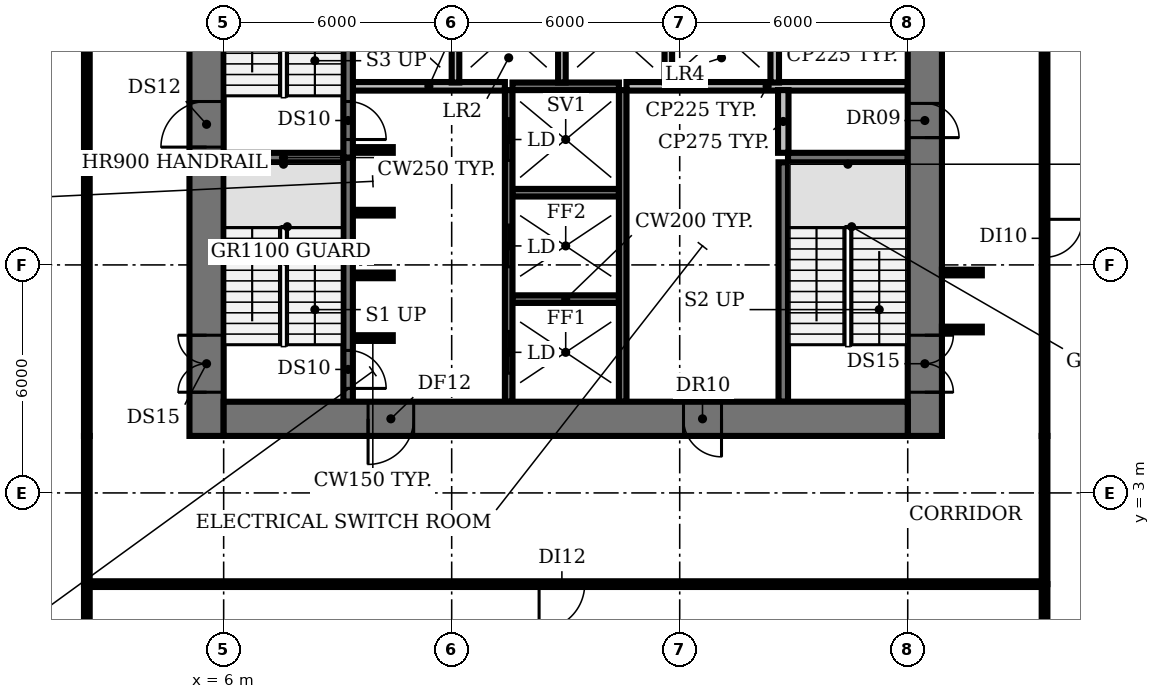
"""IFC4 building model, lengths in metres.
Left out: names, types, materials, properties, quantities, classifications, styles, units other than length and angle.
Written with IfcOpenShell. Run it as: python <this file> out.ifc"""

import sys

from ifc_helpers import new_model, si_unit, direction, frame, frame_2d, origin, place, context, subcontext, project, spatial, rectangle, extrude, element, fill, save


model = new_model("IFC4")
c1 = context("Model", 3, precision=1e-05, world=origin(), true_north=direction((0.0, 1.0)))
c2 = subcontext(c1, "Body", "Model", "MODEL_VIEW")
j1 = project(units=[si_unit("LENGTHUNIT", "METRE"), si_unit("PLANEANGLEUNIT", "RADIAN")], contexts=[c1])
p1 = place(None, origin())
s1 = spatial("IfcSite", under=j1, at=p1, CompositionType="ELEMENT")
p2 = place(p1, origin())
s2 = spatial("IfcBuilding", under=s1, at=p2, CompositionType="ELEMENT")
p3 = place(p2, frame((0.0, 0.0, 45.8)))
s3 = spatial("IfcBuildingStorey", under=s2, at=p3, CompositionType="ELEMENT", Elevation=45.8)
p4 = place(p3, frame((9.4, 7.075, 0.0), z_axis=(0.0, 0.0, 1.0), x_axis=(1.0, 0.0, 0.0)))
e1 = element("IfcWall", 1, at=p4, inside=s3, PredefinedType="SHEAR", context=c2, shape_type="SweptSolid", body=[
    extrude(rectangle(XDim=1.05, YDim=0.15, at=frame_2d((0.525, 0.0))), origin(), (0.0, 0.0, 1.0), 3.85),
])
p5 = place(p3, frame((13.6, 8.1, 0.0), z_axis=(0.0, 0.0, 1.0), x_axis=(1.0, 0.0, 0.0)))
e2 = element("IfcWall", 2, at=p5, inside=s3, PredefinedType="SHEAR", context=c2, shape_type="SweptSolid", body=[
    extrude(rectangle(XDim=2.8, YDim=0.2, at=frame_2d((1.4, 0.0))), origin(), (0.0, 0.0, 1.0), 3.85),
])
for number, where, z_axis, x_axis in (
    (3, (9.4, 8.725, 0.0), (0.0, 0.0, 1.0), (1.0, 0.0, 0.0)),
    (4, (9.4, 10.375, 0.0), (0.0, 0.0, 1.0), (1.0, 0.0, 0.0)),
):
    element("IfcWall", number, at=place(p3, frame(where, z_axis=z_axis, x_axis=x_axis)), inside=s3, PredefinedType="SHEAR", context=c2, shape_type="SweptSolid", body=[
        extrude(rectangle(XDim=1.05, YDim=0.15, at=frame_2d((0.525, 0.0))), origin(), (0.0, 0.0, 1.0), 3.85),
    ])
p6 = place(p3, frame((13.6, 10.9, 0.0), z_axis=(0.0, 0.0, 1.0), x_axis=(1.0, 0.0, 0.0)))
e5 = element("IfcWall", 5, at=p6, inside=s3, PredefinedType="SHEAR", context=c2, shape_type="SweptSolid", body=[
    extrude(rectangle(XDim=2.8, YDim=0.2, at=frame_2d((1.4, 0.0))), origin(), (0.0, 0.0, 1.0), 3.85),
])
for number, where, z_axis, x_axis in (
    (6, (6.0, 11.825, 0.0), (0.0, 0.0, 1.0), (1.0, 0.0, 0.0)),
    (7, (20.85, 11.825, 0.0), (0.0, 0.0, 1.0), (1.0, 0.0, 0.0)),
):
    element("IfcWall", number, at=place(p3, frame(where, z_axis=z_axis, x_axis=x_axis)), inside=s3, PredefinedType="SHEAR", context=c2, shape_type="SweptSolid", body=[
        extrude(rectangle(XDim=3.15, YDim=0.25, at=frame_2d((1.575, 0.0))), origin(), (0.0, 0.0, 1.0), 3.85),
    ])
p7 = place(p3, frame((9.4, 12.025, 0.0), z_axis=(0.0, 0.0, 1.0), x_axis=(1.0, 0.0, 0.0)))
e8 = element("IfcWall", 8, at=p7, inside=s3, PredefinedType="SHEAR", context=c2, shape_type="SweptSolid", body=[
    extrude(rectangle(XDim=1.05, YDim=0.15, at=frame_2d((0.525, 0.0))), origin(), (0.0, 0.0, 1.0), 3.85),
])
p8 = place(p3, frame((9.4, 13.7, 0.0), z_axis=(0.0, 0.0, 1.0), x_axis=(1.0, 0.0, 0.0)))
e9 = element("IfcWall", 9, at=p8, inside=s3, PredefinedType="PARTITIONING", context=c2, shape_type="SweptSolid", body=[
    extrude(rectangle(XDim=4.0, YDim=0.225, at=frame_2d((2.0, 0.0))), origin(), (0.0, 0.0, 1.0), 3.85),
])
p9 = place(p3, frame((13.6, 13.7, 0.0), z_axis=(0.0, 0.0, 1.0), x_axis=(1.0, 0.0, 0.0)))
e10 = element("IfcWall", 10, at=p9, inside=s3, PredefinedType="SHEAR", context=c2, shape_type="SweptSolid", body=[
    extrude(rectangle(XDim=2.8, YDim=0.2, at=frame_2d((1.4, 0.0))), origin(), (0.0, 0.0, 1.0), 3.85),
])
p10 = place(p3, frame((16.6, 13.7, 0.0), z_axis=(0.0, 0.0, 1.0), x_axis=(1.0, 0.0, 0.0)))
e11 = element("IfcWall", 11, at=p10, inside=s3, PredefinedType="PARTITIONING", context=c2, shape_type="SweptSolid", body=[
    extrude(rectangle(XDim=7.4, YDim=0.225, at=frame_2d((3.7, 0.0))), origin(), (0.0, 0.0, 1.0), 3.85),
])
p11 = place(p3, frame((9.275, 11.825, 0.0), z_axis=(0.0, 0.0, 1.0), x_axis=(0.0, -1.0, 0.0)))
e12 = element("IfcWall", 12, at=p11, inside=s3, PredefinedType="SHEAR", context=c2, shape_type="SweptSolid", body=[
    extrude(rectangle(XDim=6.425, YDim=0.25, at=frame_2d((3.212, 0.0))), origin(), (0.0, 0.0, 1.0), 3.85),
])
p12 = place(p11, frame((5.075, 0.0, 0.0)))
e13 = element("IfcOpeningElement", 13, at=p12, cuts=e12, PredefinedType="OPENING", context=c2, shape_type="SweptSolid", body=[
    extrude(rectangle(XDim=1.0, YDim=2.1, at=frame_2d((0.5, 1.05))), frame((0.0, 0.135, 0.0), z_axis=(0.0, -1.0, 0.0), x_axis=(1.0, 0.0, 0.0)), (0.0, 0.0, 1.0), 0.27),
])
p13 = place(p3, frame((9.275, 18.375, 0.0), z_axis=(0.0, 0.0, 1.0), x_axis=(0.0, -1.0, 0.0)))
e14 = element("IfcWall", 14, at=p13, inside=s3, PredefinedType="SHEAR", context=c2, shape_type="SweptSolid", body=[
    extrude(rectangle(XDim=6.55, YDim=0.25, at=frame_2d((3.275, 0.0))), origin(), (0.0, 0.0, 1.0), 3.85),
])
p14 = place(p13, frame((5.075, 0.0, 0.0)))
e15 = element("IfcOpeningElement", 15, at=p14, cuts=e14, PredefinedType="OPENING", context=c2, shape_type="SweptSolid", body=[
    extrude(rectangle(XDim=1.0, YDim=2.1, at=frame_2d((0.5, 1.05))), frame((0.0, 0.135, 0.0), z_axis=(0.0, -1.0, 0.0), x_axis=(1.0, 0.0, 0.0)), (0.0, 0.0, 1.0), 0.27),
])
p15 = place(p3, frame((12.1, 13.8, 0.0), z_axis=(0.0, 0.0, 1.0), x_axis=(0.0, 1.0, 0.0)))
e16 = element("IfcWall", 16, at=p15, inside=s3, PredefinedType="SOLIDWALL", context=c2, shape_type="SweptSolid", body=[
    extrude(rectangle(XDim=2.6, YDim=0.2, at=frame_2d((1.3, 0.0))), origin(), (0.0, 0.0, 1.0), 3.85),
])
p16 = place(p3, frame((13.5, 5.4, 0.0), z_axis=(0.0, 0.0, 1.0), x_axis=(0.0, 1.0, 0.0)))
e17 = element("IfcWall", 17, at=p16, inside=s3, PredefinedType="SHEAR", context=c2, shape_type="SweptSolid", body=[
    extrude(rectangle(XDim=8.2, YDim=0.2, at=frame_2d((4.1, 0.0))), origin(), (0.0, 0.0, 1.0), 3.85),
])
p17 = place(p16, frame((0.75, 0.0, 0.0)))
e18 = element("IfcOpeningElement", 18, at=p17, cuts=e17, PredefinedType="OPENING", context=c2, shape_type="SweptSolid", body=[
    extrude(rectangle(XDim=1.1, YDim=2.1, at=frame_2d((0.55, 1.05))), frame((0.0, 0.11, 0.0), z_axis=(0.0, -1.0, 0.0), x_axis=(1.0, 0.0, 0.0)), (0.0, 0.0, 1.0), 0.22),
])
p18 = place(p16, frame((3.55, 0.0, 0.0)))
e19 = element("IfcOpeningElement", 19, at=p18, cuts=e17, PredefinedType="OPENING", context=c2, shape_type="SweptSolid", body=[
    extrude(rectangle(XDim=1.1, YDim=2.1, at=frame_2d((0.55, 1.05))), frame((0.0, 0.11, 0.0), z_axis=(0.0, -1.0, 0.0), x_axis=(1.0, 0.0, 0.0)), (0.0, 0.0, 1.0), 0.22),
])
p19 = place(p16, frame((6.35, 0.0, 0.0)))
e20 = element("IfcOpeningElement", 20, at=p19, cuts=e17, PredefinedType="OPENING", context=c2, shape_type="SweptSolid", body=[
    extrude(rectangle(XDim=1.1, YDim=2.1, at=frame_2d((0.55, 1.05))), frame((0.0, 0.11, 0.0), z_axis=(0.0, -1.0, 0.0), x_axis=(1.0, 0.0, 0.0)), (0.0, 0.0, 1.0), 0.22),
])
p20 = place(p3, frame((14.9, 13.8, 0.0), z_axis=(0.0, 0.0, 1.0), x_axis=(0.0, 1.0, 0.0)))
e21 = element("IfcWall", 21, at=p20, inside=s3, PredefinedType="SOLIDWALL", context=c2, shape_type="SweptSolid", body=[
    extrude(rectangle(XDim=2.6, YDim=0.2, at=frame_2d((1.3, 0.0))), origin(), (0.0, 0.0, 1.0), 3.85),
])
p21 = place(p3, frame((16.5, 5.4, 0.0), z_axis=(0.0, 0.0, 1.0), x_axis=(0.0, 1.0, 0.0)))
e22 = element("IfcWall", 22, at=p21, inside=s3, PredefinedType="SHEAR", context=c2, shape_type="SweptSolid", body=[
    extrude(rectangle(XDim=8.2, YDim=0.2, at=frame_2d((4.1, 0.0))), origin(), (0.0, 0.0, 1.0), 3.85),
])
p22 = place(p3, frame((17.7, 13.8, 0.0), z_axis=(0.0, 0.0, 1.0), x_axis=(0.0, 1.0, 0.0)))
e23 = element("IfcWall", 23, at=p22, inside=s3, PredefinedType="SOLIDWALL", context=c2, shape_type="SweptSolid", body=[
    extrude(rectangle(XDim=2.6, YDim=0.2, at=frame_2d((1.3, 0.0))), origin(), (0.0, 0.0, 1.0), 3.85),
])
p23 = place(p3, frame((20.5, 13.8, 0.0), z_axis=(0.0, 0.0, 1.0), x_axis=(0.0, 1.0, 0.0)))
e24 = element("IfcWall", 24, at=p23, inside=s3, PredefinedType="PARTITIONING", context=c2, shape_type="SweptSolid", body=[
    extrude(rectangle(XDim=2.6, YDim=0.225, at=frame_2d((1.3, 0.0))), origin(), (0.0, 0.0, 1.0), 3.85),
])
p24 = place(p3, frame((20.725, 5.4, 0.0), z_axis=(0.0, 0.0, 1.0), x_axis=(0.0, 1.0, 0.0)))
e25 = element("IfcWall", 25, at=p24, inside=s3, PredefinedType="SHEAR", context=c2, shape_type="SweptSolid", body=[
    extrude(rectangle(XDim=6.3, YDim=0.25, at=frame_2d((3.15, 0.0))), origin(), (0.0, 0.0, 1.0), 3.85),
])
p25 = place(p3, frame((20.725, 11.95, 0.0), z_axis=(0.0, 0.0, 1.0), x_axis=(0.0, 1.0, 0.0)))
e26 = element("IfcWall", 26, at=p25, inside=s3, PredefinedType="PARTITIONING", context=c2, shape_type="SweptSolid", body=[
    extrude(rectangle(XDim=1.65, YDim=0.275, at=frame_2d((0.825, 0.0))), origin(), (0.0, 0.0, 1.0), 3.85),
])
p26 = place(p3, frame((5.55, 4.5, 0.0), z_axis=(0.0, 0.0, 1.0), x_axis=(0.0, 1.0, 0.0)))
e27 = element("IfcWall", 27, at=p26, inside=s3, PredefinedType="SHEAR", context=c2, shape_type="SweptSolid", body=[
    extrude(rectangle(XDim=21.2, YDim=0.9, at=frame_2d((10.6, 0.0))), origin(), (0.0, 0.0, 1.0), 3.85),
])
p27 = place(p26, frame((1.15, 0.0, 0.0)))
e28 = element("IfcOpeningElement", 28, at=p27, cuts=e27, PredefinedType="OPENING", context=c2, shape_type="SweptSolid", body=[
    extrude(rectangle(XDim=1.5, YDim=2.1, at=frame_2d((0.75, 1.05))), frame((0.0, 0.46, 0.0), z_axis=(0.0, -1.0, 0.0), x_axis=(1.0, 0.0, 0.0)), (0.0, 0.0, 1.0), 0.92),
])
p28 = place(p26, frame((7.6, 0.0, 0.0)))
e29 = element("IfcOpeningElement", 29, at=p28, cuts=e27, PredefinedType="OPENING", context=c2, shape_type="SweptSolid", body=[
    extrude(rectangle(XDim=1.2, YDim=2.1, at=frame_2d((0.6, 1.05))), frame((0.0, 0.46, 0.0), z_axis=(0.0, -1.0, 0.0), x_axis=(1.0, 0.0, 0.0)), (0.0, 0.0, 1.0), 0.92),
])
p29 = place(p26, frame((14.15, 0.0, 0.0)))
e30 = element("IfcOpeningElement", 30, at=p29, cuts=e27, PredefinedType="OPENING", context=c2, shape_type="SweptSolid", body=[
    extrude(rectangle(XDim=1.2, YDim=2.1, at=frame_2d((0.6, 1.05))), frame((0.0, 0.46, 0.0), z_axis=(0.0, -1.0, 0.0), x_axis=(1.0, 0.0, 0.0)), (0.0, 0.0, 1.0), 0.92),
])
p30 = place(p3, frame((24.45, 25.7, 0.0), z_axis=(0.0, 0.0, 1.0), x_axis=(0.0, -1.0, 0.0)))
e31 = element("IfcWall", 31, at=p30, inside=s3, PredefinedType="SHEAR", context=c2, shape_type="SweptSolid", body=[
    extrude(rectangle(XDim=21.2, YDim=0.9, at=frame_2d((10.6, 0.0))), origin(), (0.0, 0.0, 1.0), 3.85),
])
p31 = place(p30, frame((18.55, 0.0, 0.0)))
e32 = element("IfcOpeningElement", 32, at=p31, cuts=e31, PredefinedType="OPENING", context=c2, shape_type="SweptSolid", body=[
    extrude(rectangle(XDim=1.5, YDim=2.1, at=frame_2d((0.75, 1.05))), frame((0.0, 0.46, 0.0), z_axis=(0.0, -1.0, 0.0), x_axis=(1.0, 0.0, 0.0)), (0.0, 0.0, 1.0), 0.92),
])
p32 = place(p30, frame((12.45, 0.0, 0.0)))
e33 = element("IfcOpeningElement", 33, at=p32, cuts=e31, PredefinedType="OPENING", context=c2, shape_type="SweptSolid", body=[
    extrude(rectangle(XDim=0.9, YDim=2.1, at=frame_2d((0.45, 1.05))), frame((0.0, 0.46, 0.0), z_axis=(0.0, -1.0, 0.0), x_axis=(1.0, 0.0, 0.0)), (0.0, 0.0, 1.0), 0.92),
])
p33 = place(p30, frame((6.45, 0.0, 0.0)))
e34 = element("IfcOpeningElement", 34, at=p33, cuts=e31, PredefinedType="OPENING", context=c2, shape_type="SweptSolid", body=[
    extrude(rectangle(XDim=2.0, YDim=2.1, at=frame_2d((1.0, 1.05))), frame((0.0, 0.46, 0.0), z_axis=(0.0, -1.0, 0.0), x_axis=(1.0, 0.0, 0.0)), (0.0, 0.0, 1.0), 0.92),
])
p34 = place(p3, frame((24.0, 4.95, 0.0), z_axis=(0.0, 0.0, 1.0), x_axis=(-1.0, 0.0, 0.0)))
e35 = element("IfcWall", 35, at=p34, inside=s3, PredefinedType="SHEAR", context=c2, shape_type="SweptSolid", body=[
    extrude(rectangle(XDim=18.0, YDim=0.9, at=frame_2d((9.0, 0.0))), origin(), (0.0, 0.0, 1.0), 3.85),
])
p35 = place(p34, frame((13.0, 0.0, 0.0)))
e36 = element("IfcOpeningElement", 36, at=p35, cuts=e35, PredefinedType="OPENING", context=c2, shape_type="SweptSolid", body=[
    extrude(rectangle(XDim=1.2, YDim=2.1, at=frame_2d((0.6, 1.05))), frame((0.0, 0.46, 0.0), z_axis=(0.0, -1.0, 0.0), x_axis=(1.0, 0.0, 0.0)), (0.0, 0.0, 1.0), 0.92),
])
p36 = place(p34, frame((4.9, 0.0, 0.0)))
e37 = element("IfcOpeningElement", 37, at=p36, cuts=e35, PredefinedType="OPENING", context=c2, shape_type="SweptSolid", body=[
    extrude(rectangle(XDim=1.0, YDim=2.1, at=frame_2d((0.5, 1.05))), frame((0.0, 0.46, 0.0), z_axis=(0.0, -1.0, 0.0), x_axis=(1.0, 0.0, 0.0)), (0.0, 0.0, 1.0), 0.92),
])
p37 = place(p3, frame((2.4, -1.862, 0.0), z_axis=(0.0, 0.0, 1.0), x_axis=(0.0, 1.0, 0.0)))
e38 = element("IfcWall", 38, at=p37, inside=s3, PredefinedType="PARTITIONING", context=c2, shape_type="SweptSolid", body=[
    extrude(rectangle(XDim=2.462, YDim=0.15, at=frame_2d((1.231, 0.0))), origin(), (0.0, 0.0, 1.0), 2.83),
])
p38 = place(p3, frame((2.4, 0.6, 0.0), z_axis=(0.0, 0.0, 1.0), x_axis=(0.0, 1.0, 0.0)))
e39 = element("IfcWall", 39, at=p38, inside=s3, PredefinedType="PARTITIONING", context=c2, shape_type="SweptSolid", body=[
    extrude(rectangle(XDim=3.9, YDim=0.15, at=frame_2d((1.95, 0.0))), origin(), (0.0, 0.0, 1.0), 2.83),
])
p39 = place(p3, frame((2.4, 4.5, 0.0), z_axis=(0.0, 0.0, 1.0), x_axis=(0.0, 1.0, 0.0)))
e40 = element("IfcWall", 40, at=p39, inside=s3, PredefinedType="PARTITIONING", context=c2, shape_type="SweptSolid", body=[
    extrude(rectangle(XDim=21.2, YDim=0.15, at=frame_2d((10.6, 0.0))), origin(), (0.0, 0.0, 1.0), 2.83),
])
p40 = place(p39, frame((10.8, 0.0, 0.0)))
e41 = element("IfcOpeningElement", 41, at=p40, cuts=e40, PredefinedType="OPENING", context=c2, shape_type="SweptSolid", body=[
    extrude(rectangle(XDim=1.2, YDim=2.1, at=frame_2d((0.6, 1.05))), frame((0.0, 0.085, 0.0), z_axis=(0.0, -1.0, 0.0), x_axis=(1.0, 0.0, 0.0)), (0.0, 0.0, 1.0), 0.17),
])
for number, where, z_axis, x_axis in (
    (42, (24.9, 7.3, 0.0), (0.0, 0.0, 1.0), (1.0, 0.0, 0.0)),
    (43, (24.9, 8.8, 0.0), (0.0, 0.0, 1.0), (1.0, 0.0, 0.0)),
):
    element("IfcWall", number, at=place(p3, frame(where, z_axis=z_axis, x_axis=x_axis)), inside=s3, PredefinedType="PARTITIONING", context=c2, shape_type="SweptSolid", body=[
        extrude(rectangle(XDim=1.05, YDim=0.15, at=frame_2d((0.525, 0.0))), origin(), (0.0, 0.0, 1.0), 2.83),
    ])
p41 = place(p3, frame((27.6, -5.01, 0.0), z_axis=(0.0, 0.0, 1.0), x_axis=(0.0, 1.0, 0.0)))
e44 = element("IfcWall", 44, at=p41, inside=s3, PredefinedType="PARTITIONING", context=c2, shape_type="SweptSolid", body=[
    extrude(rectangle(XDim=5.61, YDim=0.15, at=frame_2d((2.805, 0.0))), origin(), (0.0, 0.0, 1.0), 2.83),
])
p42 = place(p3, frame((27.6, 0.6, 0.0), z_axis=(0.0, 0.0, 1.0), x_axis=(-1.0, 0.0, 0.0)))
e45 = element("IfcWall", 45, at=p42, inside=s3, PredefinedType="PARTITIONING", context=c2, shape_type="SweptSolid", body=[
    extrude(rectangle(XDim=25.2, YDim=0.15, at=frame_2d((12.6, 0.0))), origin(), (0.0, 0.0, 1.0), 2.83),
])
p43 = place(p42, frame((12.1, 0.0, 0.0)))
e46 = element("IfcOpeningElement", 46, at=p43, cuts=e45, PredefinedType="OPENING", context=c2, shape_type="SweptSolid", body=[
    extrude(rectangle(XDim=1.2, YDim=2.1, at=frame_2d((0.6, 1.05))), frame((0.0, 0.085, 0.0), z_axis=(0.0, -1.0, 0.0), x_axis=(1.0, 0.0, 0.0)), (0.0, 0.0, 1.0), 0.17),
])
p44 = place(p3, frame((27.6, 0.6, 0.0), z_axis=(0.0, 0.0, 1.0), x_axis=(0.0, 1.0, 0.0)))
e47 = element("IfcWall", 47, at=p44, inside=s3, PredefinedType="PARTITIONING", context=c2, shape_type="SweptSolid", body=[
    extrude(rectangle(XDim=3.9, YDim=0.15, at=frame_2d((1.95, 0.0))), origin(), (0.0, 0.0, 1.0), 2.83),
])
p45 = place(p3, frame((27.6, 15.0, 0.0), z_axis=(0.0, 0.0, 1.0), x_axis=(0.0, -1.0, 0.0)))
e48 = element("IfcWall", 48, at=p45, inside=s3, PredefinedType="PARTITIONING", context=c2, shape_type="SweptSolid", body=[
    extrude(rectangle(XDim=10.5, YDim=0.15, at=frame_2d((5.25, 0.0))), origin(), (0.0, 0.0, 1.0), 2.83),
])
p46 = place(p45, frame((4.8, 0.0, 0.0)))
e49 = element("IfcOpeningElement", 49, at=p46, cuts=e48, PredefinedType="OPENING", context=c2, shape_type="SweptSolid", body=[
    extrude(rectangle(XDim=1.0, YDim=2.1, at=frame_2d((0.5, 1.05))), frame((0.0, 0.085, 0.0), z_axis=(0.0, -1.0, 0.0), x_axis=(1.0, 0.0, 0.0)), (0.0, 0.0, 1.0), 0.17),
])
p47 = place(p12, origin())
e50 = element("IfcDoor", 50, at=p47, inside=s3, OperationType="SINGLE_SWING_RIGHT", PredefinedType="DOOR", context=c2, shape_type="SweptSolid", body=[
    extrude(rectangle(XDim=1.0, YDim=2.1, at=frame_2d((0.5, 1.05))), frame((0.0, 0.025, 0.0), z_axis=(0.0, -1.0, 0.0), x_axis=(1.0, 0.0, 0.0)), (0.0, 0.0, 1.0), 0.05),
])
fill(e13, e50)
p48 = place(p14, origin())
e51 = element("IfcDoor", 51, at=p48, inside=s3, OperationType="SINGLE_SWING_RIGHT", PredefinedType="DOOR", context=c2, shape_type="SweptSolid", body=[
    extrude(rectangle(XDim=1.0, YDim=2.1, at=frame_2d((0.5, 1.05))), frame((0.0, 0.025, 0.0), z_axis=(0.0, -1.0, 0.0), x_axis=(1.0, 0.0, 0.0)), (0.0, 0.0, 1.0), 0.05),
])
fill(e15, e51)
p49 = place(p17, origin())
e52 = element("IfcDoor", 52, at=p49, inside=s3, OperationType="DOUBLE_DOOR_SLIDING", PredefinedType="DOOR", context=c2, shape_type="SweptSolid", body=[
    extrude(rectangle(XDim=1.1, YDim=2.1, at=frame_2d((0.55, 1.05))), frame((0.0, 0.025, 0.0), z_axis=(0.0, -1.0, 0.0), x_axis=(1.0, 0.0, 0.0)), (0.0, 0.0, 1.0), 0.05),
])
fill(e18, e52)
p50 = place(p18, origin())
e53 = element("IfcDoor", 53, at=p50, inside=s3, OperationType="DOUBLE_DOOR_SLIDING", PredefinedType="DOOR", context=c2, shape_type="SweptSolid", body=[
    extrude(rectangle(XDim=1.1, YDim=2.1, at=frame_2d((0.55, 1.05))), frame((0.0, 0.025, 0.0), z_axis=(0.0, -1.0, 0.0), x_axis=(1.0, 0.0, 0.0)), (0.0, 0.0, 1.0), 0.05),
])
fill(e19, e53)
p51 = place(p19, origin())
e54 = element("IfcDoor", 54, at=p51, inside=s3, OperationType="DOUBLE_DOOR_SLIDING", PredefinedType="DOOR", context=c2, shape_type="SweptSolid", body=[
    extrude(rectangle(XDim=1.1, YDim=2.1, at=frame_2d((0.55, 1.05))), frame((0.0, 0.025, 0.0), z_axis=(0.0, -1.0, 0.0), x_axis=(1.0, 0.0, 0.0)), (0.0, 0.0, 1.0), 0.05),
])
fill(e20, e54)
p52 = place(p27, origin())
e55 = element("IfcDoor", 55, at=p52, inside=s3, OperationType="DOUBLE_DOOR_SINGLE_SWING", PredefinedType="DOOR", context=c2, shape_type="SweptSolid", body=[
    extrude(rectangle(XDim=1.5, YDim=2.1, at=frame_2d((0.75, 1.05))), frame((0.0, 0.025, 0.0), z_axis=(0.0, -1.0, 0.0), x_axis=(1.0, 0.0, 0.0)), (0.0, 0.0, 1.0), 0.05),
])
fill(e28, e55)
p53 = place(p28, origin())
e56 = element("IfcDoor", 56, at=p53, inside=s3, OperationType="SINGLE_SWING_LEFT", PredefinedType="DOOR", context=c2, shape_type="SweptSolid", body=[
    extrude(rectangle(XDim=1.2, YDim=2.1, at=frame_2d((0.6, 1.05))), frame((0.0, 0.025, 0.0), z_axis=(0.0, -1.0, 0.0), x_axis=(1.0, 0.0, 0.0)), (0.0, 0.0, 1.0), 0.05),
])
fill(e29, e56)
p54 = place(p31, origin())
e57 = element("IfcDoor", 57, at=p54, inside=s3, OperationType="DOUBLE_DOOR_SINGLE_SWING", PredefinedType="DOOR", context=c2, shape_type="SweptSolid", body=[
    extrude(rectangle(XDim=1.5, YDim=2.1, at=frame_2d((0.75, 1.05))), frame((0.0, 0.025, 0.0), z_axis=(0.0, -1.0, 0.0), x_axis=(1.0, 0.0, 0.0)), (0.0, 0.0, 1.0), 0.05),
])
fill(e32, e57)
p55 = place(p32, origin())
e58 = element("IfcDoor", 58, at=p55, inside=s3, OperationType="SINGLE_SWING_RIGHT", PredefinedType="DOOR", context=c2, shape_type="SweptSolid", body=[
    extrude(rectangle(XDim=0.9, YDim=2.1, at=frame_2d((0.45, 1.05))), frame((0.0, -0.39, 0.0), z_axis=(0.0, -1.0, 0.0), x_axis=(1.0, 0.0, 0.0)), (0.0, 0.0, 1.0), 0.05),
])
fill(e33, e58)
p56 = place(p35, origin())
e59 = element("IfcDoor", 59, at=p56, inside=s3, OperationType="SINGLE_SWING_RIGHT", PredefinedType="DOOR", context=c2, shape_type="SweptSolid", body=[
    extrude(rectangle(XDim=1.2, YDim=2.1, at=frame_2d((0.6, 1.05))), frame((0.0, 0.025, 0.0), z_axis=(0.0, -1.0, 0.0), x_axis=(1.0, 0.0, 0.0)), (0.0, 0.0, 1.0), 0.05),
])
fill(e36, e59)
p57 = place(p36, origin())
e60 = element("IfcDoor", 60, at=p57, inside=s3, OperationType="SINGLE_SWING_LEFT", PredefinedType="DOOR", context=c2, shape_type="SweptSolid", body=[
    extrude(rectangle(XDim=1.0, YDim=2.1, at=frame_2d((0.5, 1.05))), frame((0.0, -0.39, 0.0), z_axis=(0.0, -1.0, 0.0), x_axis=(1.0, 0.0, 0.0)), (0.0, 0.0, 1.0), 0.05),
])
fill(e37, e60)
p58 = place(p43, origin())
e61 = element("IfcDoor", 61, at=p58, inside=s3, OperationType="SINGLE_SWING_RIGHT", PredefinedType="DOOR", context=c2, shape_type="SweptSolid", body=[
    extrude(rectangle(XDim=1.2, YDim=2.1, at=frame_2d((0.6, 1.05))), frame((0.0, 0.025, 0.0), z_axis=(0.0, -1.0, 0.0), x_axis=(1.0, 0.0, 0.0)), (0.0, 0.0, 1.0), 0.05),
])
fill(e46, e61)
p59 = place(p46, origin())
e62 = element("IfcDoor", 62, at=p59, inside=s3, OperationType="SINGLE_SWING_LEFT", PredefinedType="DOOR", context=c2, shape_type="SweptSolid", body=[
    extrude(rectangle(XDim=1.0, YDim=2.1, at=frame_2d((0.5, 1.05))), frame((0.0, 0.025, 0.0), z_axis=(0.0, -1.0, 0.0), x_axis=(1.0, 0.0, 0.0)), (0.0, 0.0, 1.0), 0.05),
])
fill(e49, e62)
save(model, sys.argv[1])
